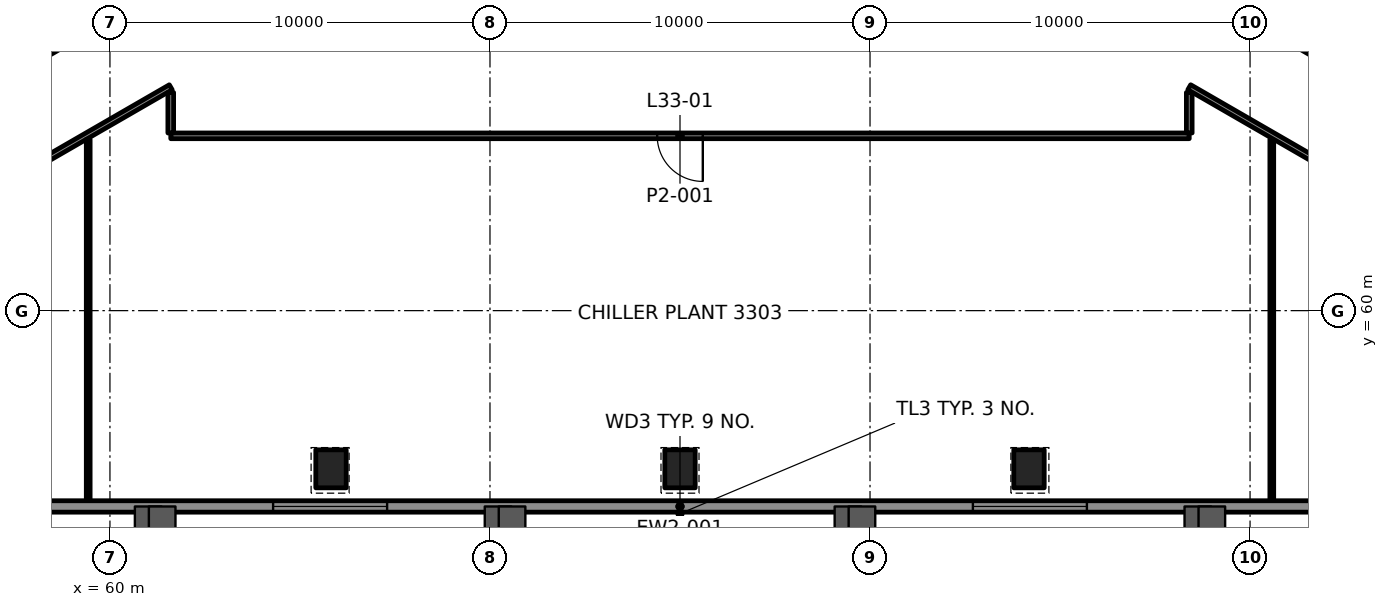
"""IFC4 building model, lengths in metres.
Left out: names, types, materials, properties, quantities, classifications, styles, units other than length and angle.
Written with IfcOpenShell. Run it as: python <this file> out.ifc"""

import sys

from ifc_helpers import new_model, si_unit, direction, frame, frame_2d, origin, origin_2d, place, context, subcontext, project, spatial, rectangle, hollow_rectangle, extrude, element, fill, save


model = new_model("IFC4")
c1 = context("Model", 3, precision=1e-05, world=origin(), true_north=direction((0.0, 1.0)))
c2 = subcontext(c1, "Body", "Model", "MODEL_VIEW")
j1 = project(units=[si_unit("LENGTHUNIT", "METRE"), si_unit("PLANEANGLEUNIT", "RADIAN")], contexts=[c1])
p1 = place(None, origin())
s1 = spatial("IfcSite", under=j1, at=p1, CompositionType="ELEMENT")
p2 = place(p1, origin())
s2 = spatial("IfcBuilding", under=s1, at=p2, CompositionType="ELEMENT")
p3 = place(p2, frame((0.0, 0.0, 146.8)))
s3 = spatial("IfcBuildingStorey", under=s2, at=p3, CompositionType="ELEMENT", Elevation=146.8)
for number, where, z_axis, x_axis in (
    (1, (65.817, 55.837, -0.0), (0.0, 0.0, 1.0), (1.0, 0.0, 0.0)),
    (2, (75.0, 55.837, -0.0), (0.0, 0.0, 1.0), (1.0, 0.0, 0.0)),
    (3, (84.183, 55.837, -0.0), (0.0, 0.0, 1.0), (1.0, 0.0, 0.0)),
):
    element("IfcColumn", number, at=place(p3, frame(where, z_axis=z_axis, x_axis=x_axis)), inside=s3, PredefinedType="COLUMN", context=c2, shape_type="SweptSolid", body=[
        extrude(hollow_rectangle(XDim=0.8, YDim=1.0, WallThickness=0.05, at=origin_2d()), origin(), (0.0, 0.0, 1.0), 4.5),
    ])
p4 = place(p3, frame((88.399, 64.6, 0.0), z_axis=(0.0, 0.0, 1.0), x_axis=(-1.0, 0.0, 0.0)))
e4 = element("IfcWall", 4, at=p4, inside=s3, PredefinedType="PARTITIONING", context=c2, shape_type="SweptSolid", body=[
    extrude(rectangle(XDim=26.799, YDim=0.15, at=frame_2d((13.399, 0.0))), origin(), (0.0, 0.0, 1.0), 3.45),
])
p5 = place(p4, frame((12.8, 0.0, 0.0)))
e5 = element("IfcOpeningElement", 5, at=p5, cuts=e4, PredefinedType="OPENING", context=c2, shape_type="SweptSolid", body=[
    extrude(rectangle(XDim=1.2, YDim=2.1, at=frame_2d((0.6, 1.05))), frame((0.0, 0.085, 0.0), z_axis=(0.0, -1.0, 0.0), x_axis=(1.0, 0.0, 0.0)), (0.0, 0.0, 1.0), 0.17),
])
p6 = place(p3, frame((61.6, 65.878, 0.0), z_axis=(0.0, 0.0, 1.0), x_axis=(-0.866027154752, -0.499996967223, 0.0)))
e6 = element("IfcWall", 6, at=p6, inside=s3, PredefinedType="PARTITIONING", context=c2, shape_type="SweptSolid", body=[
    extrude(rectangle(XDim=14.524, YDim=0.15, at=frame_2d((7.262, 0.0))), origin(), (0.0, 0.0, 1.0), 3.297),
])
p7 = place(p6, frame((7.965, 0.0, 0.0)))
e7 = element("IfcOpeningElement", 7, at=p7, cuts=e6, PredefinedType="OPENING", context=c2, shape_type="SweptSolid", body=[
    extrude(rectangle(XDim=0.9, YDim=2.1, at=frame_2d((0.45, 1.05))), frame((0.0, 0.085, 0.0), z_axis=(0.0, -1.0, 0.0), x_axis=(1.0, 0.0, 0.0)), (0.0, 0.0, 1.0), 0.17),
])
p8 = place(p3, frame((47.822, 60.693, 0.0), z_axis=(0.0, 0.0, 1.0), x_axis=(0.866022169491, 0.500005601919, 0.0)))
e8 = element("IfcWall", 8, at=p8, inside=s3, PredefinedType="PARTITIONING", context=c2, shape_type="SweptSolid", body=[
    extrude(rectangle(XDim=15.823, YDim=0.15, at=frame_2d((7.912, 0.0))), origin(), (0.0, 0.0, 1.0), 3.45),
])
p9 = place(p8, frame((7.312, 0.0, 0.0)))
e9 = element("IfcOpeningElement", 9, at=p9, cuts=e8, PredefinedType="OPENING", context=c2, shape_type="SweptSolid", body=[
    extrude(rectangle(XDim=1.2, YDim=2.1, at=frame_2d((0.6, 1.05))), frame((0.0, 0.085, 0.0), z_axis=(0.0, -1.0, 0.0), x_axis=(1.0, 0.0, 0.0)), (0.0, 0.0, 1.0), 0.17),
])
p10 = place(p3, frame((90.572, 54.877, 0.0), z_axis=(0.0, 0.0, 1.0), x_axis=(0.0, 1.0, 0.0)))
e10 = element("IfcWall", 10, at=p10, inside=s3, PredefinedType="PARTITIONING", context=c2, shape_type="SweptSolid", body=[
    extrude(rectangle(XDim=9.63, YDim=0.1, at=frame_2d((4.815, 0.0))), origin(), (0.0, 0.0, 1.0), 3.215),
])
for number, where, z_axis, x_axis in (
    (11, (88.4, 64.676, 0.0), (0.0, 0.0, 1.0), (0.0, 1.0, 0.0)),
    (12, (61.6, 64.676, 0.0), (0.0, 0.0, 1.0), (0.0, 1.0, 0.0)),
):
    element("IfcWall", number, at=place(p3, frame(where, z_axis=z_axis, x_axis=x_axis)), inside=s3, PredefinedType="PARTITIONING", context=c2, shape_type="SweptSolid", body=[
        extrude(rectangle(XDim=1.066, YDim=0.15, at=frame_2d((0.533, 0.0))), origin(), (0.0, 0.0, 1.0), 3.297),
    ])
p11 = place(p3, frame((59.428, 54.877, 0.0), z_axis=(0.0, 0.0, 1.0), x_axis=(0.0, 1.0, 0.0)))
e13 = element("IfcWall", 13, at=p11, inside=s3, PredefinedType="PARTITIONING", context=c2, shape_type="SweptSolid", body=[
    extrude(rectangle(XDim=9.63, YDim=0.1, at=frame_2d((4.815, 0.0))), origin(), (0.0, 0.0, 1.0), 3.215),
])
p12 = place(p3, frame((88.475, 68.606, 0.0), z_axis=(0.0, 0.0, 1.0), x_axis=(0.866022169491, -0.500005601919, 0.0)))
e14 = element("IfcWall", 14, at=p12, inside=s3, PredefinedType="PARTITIONING", context=c2, shape_type="SweptSolid", body=[
    extrude(rectangle(XDim=15.823, YDim=0.15, at=frame_2d((7.912, 0.0))), origin(), (0.0, 0.0, 1.0), 3.45),
])
p13 = place(p12, frame((7.88, 0.0, 0.0)))
e15 = element("IfcOpeningElement", 15, at=p13, cuts=e14, PredefinedType="OPENING", context=c2, shape_type="SweptSolid", body=[
    extrude(rectangle(XDim=0.9, YDim=2.1, at=frame_2d((0.45, 1.05))), frame((0.0, 0.085, 0.0), z_axis=(0.0, -1.0, 0.0), x_axis=(1.0, 0.0, 0.0)), (0.0, 0.0, 1.0), 0.17),
])
p14 = place(p3, frame((100.979, 58.616, 0.0), z_axis=(0.0, 0.0, 1.0), x_axis=(-0.866027154752, 0.499996967223, 0.0)))
e16 = element("IfcWall", 16, at=p14, inside=s3, PredefinedType="PARTITIONING", context=c2, shape_type="SweptSolid", body=[
    extrude(rectangle(XDim=14.524, YDim=0.15, at=frame_2d((7.262, 0.0))), origin(), (0.0, 0.0, 1.0), 3.297),
])
p15 = place(p14, frame((5.66, 0.0, 0.0)))
e17 = element("IfcOpeningElement", 17, at=p15, cuts=e16, PredefinedType="OPENING", context=c2, shape_type="SweptSolid", body=[
    extrude(rectangle(XDim=0.9, YDim=2.1, at=frame_2d((0.45, 1.05))), frame((0.0, 0.085, 0.0), z_axis=(0.0, -1.0, 0.0), x_axis=(1.0, 0.0, 0.0)), (0.0, 0.0, 1.0), 0.17),
])
p16 = place(p3, frame((47.398, 54.847, 0.0), z_axis=(0.0, 0.0, 1.0), x_axis=(1.0, 0.0, 0.0)))
e18 = element("IfcWall", 18, at=p16, inside=s3, PredefinedType="SOLIDWALL", context=c2, shape_type="SweptSolid", body=[
    extrude(rectangle(XDim=55.204, YDim=0.3, at=frame_2d((27.602, 0.0))), origin(), (0.0, 0.0, 1.0), 4.05),
])
p17 = place(p16, frame((16.895, 0.0, 0.8)))
e19 = element("IfcOpeningElement", 19, at=p17, cuts=e18, PredefinedType="OPENING", context=c2, shape_type="SweptSolid", body=[
    extrude(rectangle(XDim=3.0, YDim=2.4, at=frame_2d((1.5, 1.2))), frame((0.0, 0.16, 0.0), z_axis=(0.0, -1.0, 0.0), x_axis=(1.0, 0.0, 0.0)), (0.0, 0.0, 1.0), 0.32),
])
p18 = place(p16, frame((35.309, 0.0, 0.8)))
e20 = element("IfcOpeningElement", 20, at=p18, cuts=e18, PredefinedType="OPENING", context=c2, shape_type="SweptSolid", body=[
    extrude(rectangle(XDim=3.0, YDim=2.4, at=frame_2d((1.5, 1.2))), frame((0.0, 0.16, 0.0), z_axis=(0.0, -1.0, 0.0), x_axis=(1.0, 0.0, 0.0)), (0.0, 0.0, 1.0), 0.32),
])
p19 = place(p3, frame((106.254, 61.172, 0.0), z_axis=(0.0, 0.0, 1.0), x_axis=(-0.500000383388, 0.866025182435, 0.0)))
e21 = element("IfcWall", 21, at=p19, inside=s3, PredefinedType="SOLIDWALL", context=c2, shape_type="SweptSolid", body=[
    extrude(rectangle(XDim=55.204, YDim=0.3, at=frame_2d((27.602, 0.0))), origin(), (0.0, 0.0, 1.0), 4.05),
])
p20 = place(p19, frame((16.895, 0.0, 0.8)))
e22 = element("IfcOpeningElement", 22, at=p20, cuts=e21, PredefinedType="OPENING", context=c2, shape_type="SweptSolid", body=[
    extrude(rectangle(XDim=3.0, YDim=2.4, at=frame_2d((1.5, 1.2))), frame((0.0, 0.16, 0.0), z_axis=(0.0, -1.0, 0.0), x_axis=(1.0, 0.0, 0.0)), (0.0, 0.0, 1.0), 0.32),
])
p21 = place(p19, frame((35.309, 0.0, 0.8)))
e23 = element("IfcOpeningElement", 23, at=p21, cuts=e21, PredefinedType="OPENING", context=c2, shape_type="SweptSolid", body=[
    extrude(rectangle(XDim=3.0, YDim=2.4, at=frame_2d((1.5, 1.2))), frame((0.0, 0.16, 0.0), z_axis=(0.0, -1.0, 0.0), x_axis=(1.0, 0.0, 0.0)), (0.0, 0.0, 1.0), 0.32),
])
p22 = place(p3, frame((71.348, 108.98, 0.0), z_axis=(0.0, 0.0, 1.0), x_axis=(-0.500000383388, -0.866025182435, 0.0)))
e24 = element("IfcWall", 24, at=p22, inside=s3, PredefinedType="SOLIDWALL", context=c2, shape_type="SweptSolid", body=[
    extrude(rectangle(XDim=55.204, YDim=0.3, at=frame_2d((27.602, 0.0))), origin(), (0.0, 0.0, 1.0), 4.05),
])
p23 = place(p22, frame((16.895, 0.0, 0.8)))
e25 = element("IfcOpeningElement", 25, at=p23, cuts=e24, PredefinedType="OPENING", context=c2, shape_type="SweptSolid", body=[
    extrude(rectangle(XDim=3.0, YDim=2.4, at=frame_2d((1.5, 1.2))), frame((0.0, 0.16, 0.0), z_axis=(0.0, -1.0, 0.0), x_axis=(1.0, 0.0, 0.0)), (0.0, 0.0, 1.0), 0.32),
])
p24 = place(p22, frame((35.309, 0.0, 0.8)))
e26 = element("IfcOpeningElement", 26, at=p24, cuts=e24, PredefinedType="OPENING", context=c2, shape_type="SweptSolid", body=[
    extrude(rectangle(XDim=3.0, YDim=2.4, at=frame_2d((1.5, 1.2))), frame((0.0, 0.16, 0.0), z_axis=(0.0, -1.0, 0.0), x_axis=(1.0, 0.0, 0.0)), (0.0, 0.0, 1.0), 0.32),
])
p25 = place(p5, origin())
e27 = element("IfcDoor", 27, at=p25, inside=s3, OperationType="DOUBLE_DOOR_SINGLE_SWING", PredefinedType="DOOR", context=c2, shape_type="SweptSolid", body=[
    extrude(rectangle(XDim=1.2, YDim=2.1, at=frame_2d((0.6, 1.05))), frame((0.0, 0.025, 0.0), z_axis=(0.0, -1.0, 0.0), x_axis=(1.0, 0.0, 0.0)), (0.0, 0.0, 1.0), 0.05),
])
fill(e5, e27)
p26 = place(p17, origin())
e28 = element("IfcWindow", 28, at=p26, inside=s3, PartitioningType="SINGLE_PANEL", PredefinedType="WINDOW", context=c2, shape_type="SweptSolid", body=[
    extrude(rectangle(XDim=3.0, YDim=2.4, at=frame_2d((1.5, 1.2))), frame((0.0, 0.03, 0.0), z_axis=(0.0, -1.0, 0.0), x_axis=(1.0, 0.0, 0.0)), (0.0, 0.0, 1.0), 0.06),
])
fill(e19, e28)
p27 = place(p18, origin())
e29 = element("IfcWindow", 29, at=p27, inside=s3, PartitioningType="SINGLE_PANEL", PredefinedType="WINDOW", context=c2, shape_type="SweptSolid", body=[
    extrude(rectangle(XDim=3.0, YDim=2.4, at=frame_2d((1.5, 1.2))), frame((0.0, 0.03, 0.0), z_axis=(0.0, -1.0, 0.0), x_axis=(1.0, 0.0, 0.0)), (0.0, 0.0, 1.0), 0.06),
])
fill(e20, e29)
save(model, sys.argv[1])
